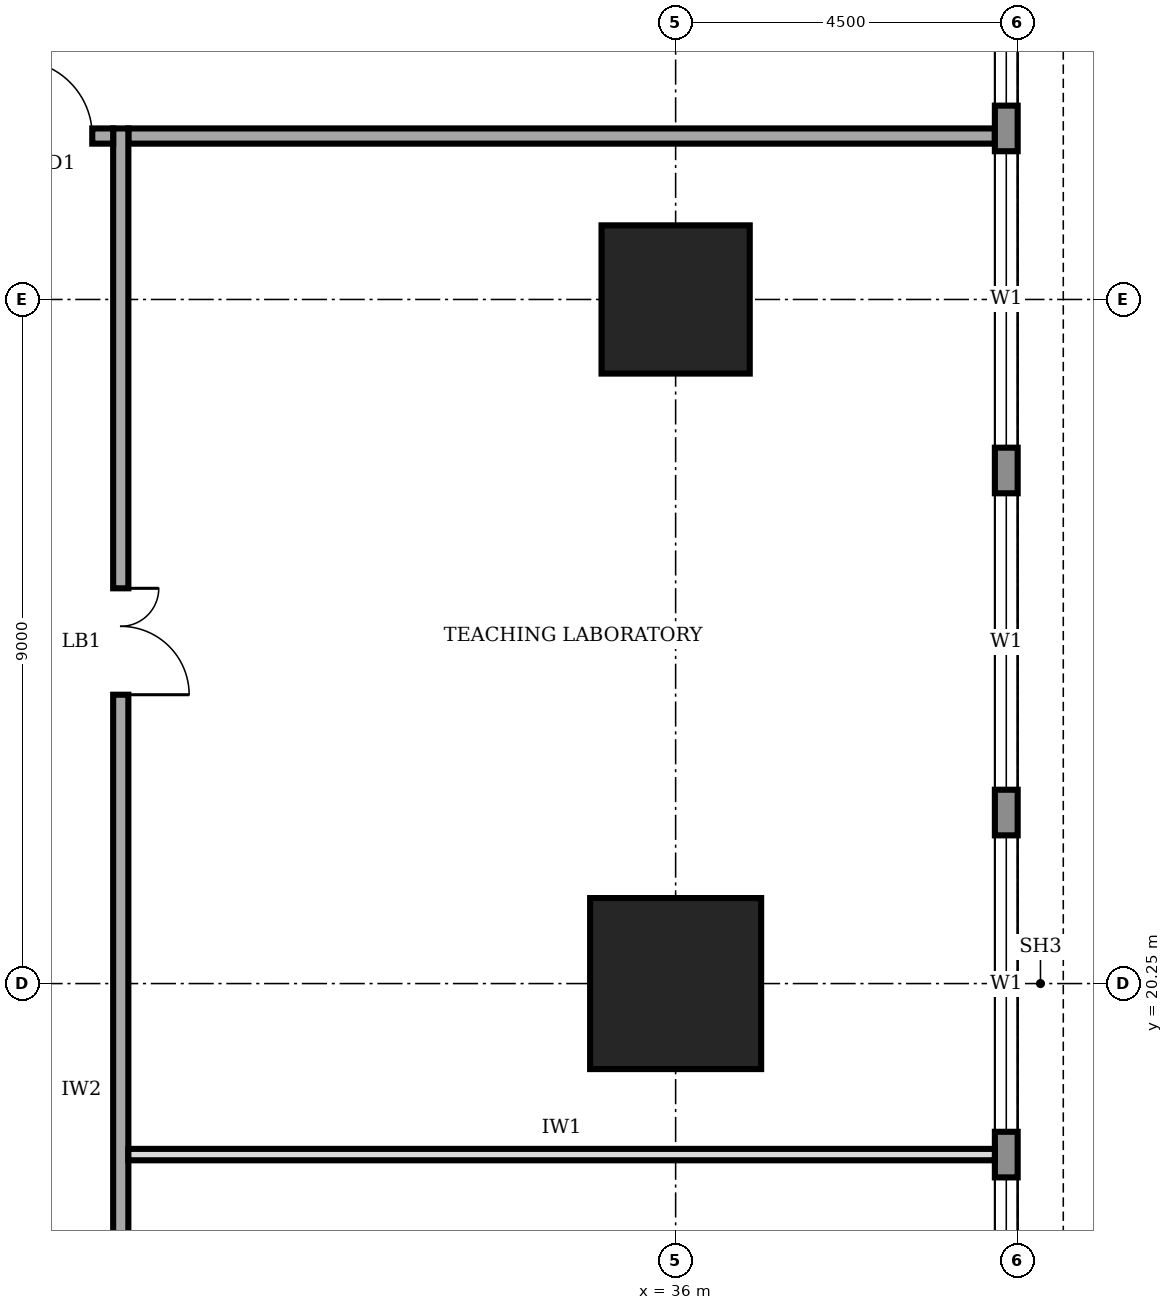
"""IFC4 building model, lengths in metres.
Left out: names, types, materials, properties, quantities, classifications, styles, units other than length and angle.
Written with IfcOpenShell. Run it as: python <this file> out.ifc"""

import sys

from ifc_helpers import new_model, si_unit, direction, frame, frame_2d, origin, origin_2d, place, context, subcontext, project, spatial, rectangle, extrude, element, fill, save


model = new_model("IFC4")
c1 = context("Model", 3, precision=1e-05, world=origin(), true_north=direction((0.0, 1.0)))
c2 = subcontext(c1, "Body", "Model", "MODEL_VIEW")
j1 = project(units=[si_unit("LENGTHUNIT", "METRE"), si_unit("PLANEANGLEUNIT", "RADIAN")], contexts=[c1])
p1 = place(None, origin())
s1 = spatial("IfcSite", under=j1, at=p1, CompositionType="ELEMENT")
p2 = place(p1, origin())
s2 = spatial("IfcBuilding", under=s1, at=p2, CompositionType="ELEMENT")
p3 = place(p2, frame((0.0, 0.0, 209.0)))
s3 = spatial("IfcBuildingStorey", under=s2, at=p3, CompositionType="ELEMENT", Elevation=209.0)
p4 = place(p3, frame((36.0, 20.25, 0.0), z_axis=(0.0, 0.0, 1.0), x_axis=(1.0, 0.0, 0.0)))
e1 = element("IfcColumn", 1, at=p4, inside=s3, PredefinedType="COLUMN", context=c2, shape_type="SweptSolid", body=[
    extrude(rectangle(XDim=2.25, YDim=2.25, at=origin_2d()), origin(), (0.0, 0.0, 1.0), 4.0),
])
p5 = place(p3, frame((36.0, 29.25, 0.0), z_axis=(0.0, 0.0, 1.0), x_axis=(1.0, 0.0, 0.0)))
e2 = element("IfcColumn", 2, at=p5, inside=s3, PredefinedType="COLUMN", context=c2, shape_type="SweptSolid", body=[
    extrude(rectangle(XDim=1.95, YDim=1.95, at=origin_2d()), origin(), (0.0, 0.0, 1.0), 4.0),
])
p6 = place(p3, frame((40.35, 4.52, 0.0), z_axis=(0.0, 0.0, 1.0), x_axis=(0.0, 1.0, 0.0)))
e3 = element("IfcWall", 3, at=p6, inside=s3, PredefinedType="STANDARD", context=c2, shape_type="SweptSolid", body=[
    extrude(rectangle(XDim=31.46, YDim=0.3, at=frame_2d((15.73, 0.0))), origin(), (0.0, 0.0, 1.0), 3.75),
])
p7 = place(p6, frame((4.78, 0.0, 0.9)))
e4 = element("IfcOpeningElement", 4, at=p7, cuts=e3, PredefinedType="OPENING", context=c2, shape_type="SweptSolid", body=[
    extrude(rectangle(XDim=3.9, YDim=2.2, at=frame_2d((1.95, 1.1))), frame((0.0, 0.16, 0.0), z_axis=(0.0, -1.0, 0.0), x_axis=(1.0, 0.0, 0.0)), (0.0, 0.0, 1.0), 0.32),
])
p8 = place(p6, frame((9.28, 0.0, 0.9)))
e5 = element("IfcOpeningElement", 5, at=p8, cuts=e3, PredefinedType="OPENING", context=c2, shape_type="SweptSolid", body=[
    extrude(rectangle(XDim=3.9, YDim=2.2, at=frame_2d((1.95, 1.1))), frame((0.0, 0.16, 0.0), z_axis=(0.0, -1.0, 0.0), x_axis=(1.0, 0.0, 0.0)), (0.0, 0.0, 1.0), 0.32),
])
p9 = place(p6, frame((13.78, 0.0, 0.9)))
e6 = element("IfcOpeningElement", 6, at=p9, cuts=e3, PredefinedType="OPENING", context=c2, shape_type="SweptSolid", body=[
    extrude(rectangle(XDim=3.9, YDim=2.2, at=frame_2d((1.95, 1.1))), frame((0.0, 0.16, 0.0), z_axis=(0.0, -1.0, 0.0), x_axis=(1.0, 0.0, 0.0)), (0.0, 0.0, 1.0), 0.32),
])
p10 = place(p6, frame((18.28, 0.0, 0.9)))
e7 = element("IfcOpeningElement", 7, at=p10, cuts=e3, PredefinedType="OPENING", context=c2, shape_type="SweptSolid", body=[
    extrude(rectangle(XDim=3.9, YDim=2.2, at=frame_2d((1.95, 1.1))), frame((0.0, 0.16, 0.0), z_axis=(0.0, -1.0, 0.0), x_axis=(1.0, 0.0, 0.0)), (0.0, 0.0, 1.0), 0.32),
])
p11 = place(p6, frame((22.78, 0.0, 0.9)))
e8 = element("IfcOpeningElement", 8, at=p11, cuts=e3, PredefinedType="OPENING", context=c2, shape_type="SweptSolid", body=[
    extrude(rectangle(XDim=3.9, YDim=2.2, at=frame_2d((1.95, 1.1))), frame((0.0, 0.16, 0.0), z_axis=(0.0, -1.0, 0.0), x_axis=(1.0, 0.0, 0.0)), (0.0, 0.0, 1.0), 0.32),
])
p12 = place(p6, frame((27.28, 0.0, 0.9)))
e9 = element("IfcOpeningElement", 9, at=p12, cuts=e3, PredefinedType="OPENING", context=c2, shape_type="SweptSolid", body=[
    extrude(rectangle(XDim=3.9, YDim=2.2, at=frame_2d((1.95, 1.1))), frame((0.0, 0.16, 0.0), z_axis=(0.0, -1.0, 0.0), x_axis=(1.0, 0.0, 0.0)), (0.0, 0.0, 1.0), 0.32),
])
p13 = place(p3, frame((28.7, 7.7, 0.0), z_axis=(0.0, 0.0, 1.0), x_axis=(0.0, 1.0, 0.0)))
e10 = element("IfcWall", 10, at=p13, inside=s3, PredefinedType="SOLIDWALL", context=c2, shape_type="SweptSolid", body=[
    extrude(rectangle(XDim=23.8, YDim=0.2, at=frame_2d((11.9, 0.0))), origin(), (0.0, 0.0, 1.0), 3.75),
])
p14 = place(p13, frame((4.15, 0.0, 0.0)))
e11 = element("IfcOpeningElement", 11, at=p14, cuts=e10, PredefinedType="OPENING", context=c2, shape_type="SweptSolid", body=[
    extrude(rectangle(XDim=1.8, YDim=2.1, at=frame_2d((0.9, 1.05))), frame((0.0, 0.11, 0.0), z_axis=(0.0, -1.0, 0.0), x_axis=(1.0, 0.0, 0.0)), (0.0, 0.0, 1.0), 0.22),
])
p15 = place(p13, frame((16.35, 0.0, 0.0)))
e12 = element("IfcOpeningElement", 12, at=p15, cuts=e10, PredefinedType="OPENING", context=c2, shape_type="SweptSolid", body=[
    extrude(rectangle(XDim=1.4, YDim=2.1, at=frame_2d((0.7, 1.05))), frame((0.0, 0.11, 0.0), z_axis=(0.0, -1.0, 0.0), x_axis=(1.0, 0.0, 0.0)), (0.0, 0.0, 1.0), 0.22),
])
p16 = place(p3, frame((28.6, 31.4, 0.0), z_axis=(0.0, 0.0, 1.0), x_axis=(-1.0, 0.0, 0.0)))
e13 = element("IfcWall", 13, at=p16, inside=s3, PredefinedType="SOLIDWALL", context=c2, shape_type="SweptSolid", body=[
    extrude(rectangle(XDim=16.9, YDim=0.2, at=frame_2d((8.45, 0.0))), origin(), (0.0, 0.0, 1.0), 3.75),
])
p17 = place(p16, frame((15.425, 0.0, 0.0)))
e14 = element("IfcOpeningElement", 14, at=p17, cuts=e13, PredefinedType="OPENING", context=c2, shape_type="SweptSolid", body=[
    extrude(rectangle(XDim=1.0, YDim=2.1, at=frame_2d((0.5, 1.05))), frame((0.0, 0.11, 0.0), z_axis=(0.0, -1.0, 0.0), x_axis=(1.0, 0.0, 0.0)), (0.0, 0.0, 1.0), 0.22),
])
p18 = place(p16, frame((12.35, 0.0, 0.0)))
e15 = element("IfcOpeningElement", 15, at=p18, cuts=e13, PredefinedType="OPENING", context=c2, shape_type="SweptSolid", body=[
    extrude(rectangle(XDim=1.0, YDim=2.1, at=frame_2d((0.5, 1.05))), frame((0.0, 0.11, 0.0), z_axis=(0.0, -1.0, 0.0), x_axis=(1.0, 0.0, 0.0)), (0.0, 0.0, 1.0), 0.22),
])
p19 = place(p16, frame((5.6, 0.0, 0.0)))
e16 = element("IfcOpeningElement", 16, at=p19, cuts=e13, PredefinedType="OPENING", context=c2, shape_type="SweptSolid", body=[
    extrude(rectangle(XDim=1.0, YDim=2.1, at=frame_2d((0.5, 1.05))), frame((0.0, 0.11, 0.0), z_axis=(0.0, -1.0, 0.0), x_axis=(1.0, 0.0, 0.0)), (0.0, 0.0, 1.0), 0.22),
])
p20 = place(p16, frame((0.275, 0.0, 0.0)))
e17 = element("IfcOpeningElement", 17, at=p20, cuts=e13, PredefinedType="OPENING", context=c2, shape_type="SweptSolid", body=[
    extrude(rectangle(XDim=1.0, YDim=2.1, at=frame_2d((0.5, 1.05))), frame((0.0, 0.11, 0.0), z_axis=(0.0, -1.0, 0.0), x_axis=(1.0, 0.0, 0.0)), (0.0, 0.0, 1.0), 0.22),
])
p21 = place(p3, frame((28.8, 31.4, 0.0), z_axis=(0.0, 0.0, 1.0), x_axis=(1.0, 0.0, 0.0)))
e18 = element("IfcWall", 18, at=p21, inside=s3, PredefinedType="SOLIDWALL", context=c2, shape_type="SweptSolid", body=[
    extrude(rectangle(XDim=11.4, YDim=0.2, at=frame_2d((5.7, 0.0))), origin(), (0.0, 0.0, 1.0), 3.75),
])
p22 = place(p3, frame((28.8, 18.0, 0.0), z_axis=(0.0, 0.0, 1.0), x_axis=(1.0, 0.0, 0.0)))
e19 = element("IfcWall", 19, at=p22, inside=s3, PredefinedType="PARTITIONING", context=c2, shape_type="SweptSolid", body=[
    extrude(rectangle(XDim=11.4, YDim=0.15, at=frame_2d((5.7, 0.0))), origin(), (0.0, 0.0, 1.0), 3.75),
])
p23 = place(p8, origin())
e20 = element("IfcWindow", 20, at=p23, inside=s3, PartitioningType="SINGLE_PANEL", PredefinedType="WINDOW", context=c2, shape_type="SweptSolid", body=[
    extrude(rectangle(XDim=3.9, YDim=2.2, at=frame_2d((1.95, 1.1))), frame((0.0, 0.03, 0.0), z_axis=(0.0, -1.0, 0.0), x_axis=(1.0, 0.0, 0.0)), (0.0, 0.0, 1.0), 0.06),
])
fill(e5, e20)
p24 = place(p9, origin())
e21 = element("IfcWindow", 21, at=p24, inside=s3, PartitioningType="SINGLE_PANEL", PredefinedType="WINDOW", context=c2, shape_type="SweptSolid", body=[
    extrude(rectangle(XDim=3.9, YDim=2.2, at=frame_2d((1.95, 1.1))), frame((0.0, 0.03, 0.0), z_axis=(0.0, -1.0, 0.0), x_axis=(1.0, 0.0, 0.0)), (0.0, 0.0, 1.0), 0.06),
])
fill(e6, e21)
p25 = place(p10, origin())
e22 = element("IfcWindow", 22, at=p25, inside=s3, PartitioningType="SINGLE_PANEL", PredefinedType="WINDOW", context=c2, shape_type="SweptSolid", body=[
    extrude(rectangle(XDim=3.9, YDim=2.2, at=frame_2d((1.95, 1.1))), frame((0.0, 0.03, 0.0), z_axis=(0.0, -1.0, 0.0), x_axis=(1.0, 0.0, 0.0)), (0.0, 0.0, 1.0), 0.06),
])
fill(e7, e22)
p26 = place(p11, origin())
e23 = element("IfcWindow", 23, at=p26, inside=s3, PartitioningType="SINGLE_PANEL", PredefinedType="WINDOW", context=c2, shape_type="SweptSolid", body=[
    extrude(rectangle(XDim=3.9, YDim=2.2, at=frame_2d((1.95, 1.1))), frame((0.0, 0.03, 0.0), z_axis=(0.0, -1.0, 0.0), x_axis=(1.0, 0.0, 0.0)), (0.0, 0.0, 1.0), 0.06),
])
fill(e8, e23)
p27 = place(p12, origin())
e24 = element("IfcWindow", 24, at=p27, inside=s3, PartitioningType="SINGLE_PANEL", PredefinedType="WINDOW", context=c2, shape_type="SweptSolid", body=[
    extrude(rectangle(XDim=3.9, YDim=2.2, at=frame_2d((1.95, 1.1))), frame((0.0, 0.03, 0.0), z_axis=(0.0, -1.0, 0.0), x_axis=(1.0, 0.0, 0.0)), (0.0, 0.0, 1.0), 0.06),
])
fill(e9, e24)
p28 = place(p15, frame((1.4, 0.0, 0.0), z_axis=(0.0, 0.0, 1.0), x_axis=(-1.0, 0.0, 0.0)))
e25 = element("IfcDoor", 25, at=p28, inside=s3, OperationType="DOUBLE_DOOR_SINGLE_SWING", PredefinedType="DOOR", context=c2, shape_type="SweptSolid", body=[
    extrude(rectangle(XDim=1.4, YDim=2.1, at=frame_2d((0.7, 1.05))), frame((0.0, 0.025, 0.0), z_axis=(0.0, -1.0, 0.0), x_axis=(1.0, 0.0, 0.0)), (0.0, 0.0, 1.0), 0.05),
])
fill(e12, e25)
p29 = place(p20, frame((1.0, 0.0, 0.0), z_axis=(0.0, 0.0, 1.0), x_axis=(-1.0, 0.0, 0.0)))
e26 = element("IfcDoor", 26, at=p29, inside=s3, OperationType="SINGLE_SWING_LEFT", PredefinedType="DOOR", context=c2, shape_type="SweptSolid", body=[
    extrude(rectangle(XDim=1.0, YDim=2.1, at=frame_2d((0.5, 1.05))), frame((0.0, 0.025, 0.0), z_axis=(0.0, -1.0, 0.0), x_axis=(1.0, 0.0, 0.0)), (0.0, 0.0, 1.0), 0.05),
])
fill(e17, e26)
save(model, sys.argv[1])
